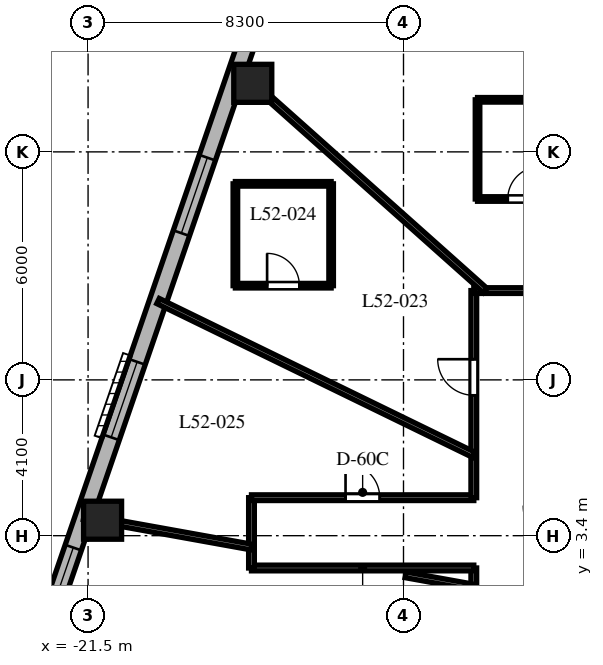
"""IFC4 building model, lengths in metres.
Left out: names, types, materials, properties, quantities, classifications, styles, units other than length and angle.
Written with IfcOpenShell. Run it as: python <this file> out.ifc"""

import sys

from ifc_helpers import new_model, si_unit, direction, frame, frame_2d, origin, origin_2d, place, context, subcontext, project, spatial, rectangle, extrude, element, fill, save


model = new_model("IFC4")
c1 = context("Model", 3, precision=1e-05, world=origin(), true_north=direction((0.0, 1.0)))
c2 = subcontext(c1, "Body", "Model", "MODEL_VIEW")
j1 = project(units=[si_unit("LENGTHUNIT", "METRE"), si_unit("PLANEANGLEUNIT", "RADIAN")], contexts=[c1])
p1 = place(None, origin())
s1 = spatial("IfcSite", under=j1, at=p1, CompositionType="ELEMENT")
p2 = place(p1, origin())
s2 = spatial("IfcBuilding", under=s1, at=p2, CompositionType="ELEMENT")
p3 = place(p2, frame((0.0, 0.0, 210.3)))
s3 = spatial("IfcBuildingStorey", under=s2, at=p3, CompositionType="ELEMENT", Elevation=210.3)
for number, where, z_axis, x_axis in (
    (1, (-17.166, 15.304, 0.0), (0.0, 0.0, 1.0), (1.0, 0.0, 0.0)),
    (2, (-21.118, 3.807, 0.0), (0.0, 0.0, 1.0), (1.0, 0.0, 0.0)),
):
    element("IfcColumn", number, at=place(p3, frame(where, z_axis=z_axis, x_axis=x_axis)), inside=s3, PredefinedType="COLUMN", context=c2, shape_type="SweptSolid", body=[
        extrude(rectangle(XDim=1.0, YDim=1.0, at=origin_2d()), origin(), (0.0, 0.0, 1.0), 3.8),
    ])
p4 = place(p3, frame((-16.324, 19.275, 0.0), z_axis=(0.0, 0.0, 1.0), x_axis=(-0.325083142304, -0.945685439557, 0.0)))
e3 = element("IfcWall", 3, at=p4, inside=s3, PredefinedType="SOLIDWALL", context=c2, shape_type="SweptSolid", body=[
    extrude(rectangle(XDim=20.224, YDim=0.45, at=frame_2d((10.112, 0.0))), origin(), (0.0, 0.0, 1.0), 3.5),
])
p5 = place(p4, frame((0.953, 0.0, 0.8)))
e4 = element("IfcOpeningElement", 4, at=p5, cuts=e3, PredefinedType="OPENING", context=c2, shape_type="SweptSolid", body=[
    extrude(rectangle(XDim=2.1, YDim=1.85, at=frame_2d((1.05, 0.925))), frame((0.0, 0.235, 0.0), z_axis=(0.0, -1.0, 0.0), x_axis=(1.0, 0.0, 0.0)), (0.0, 0.0, 1.0), 0.47),
])
p6 = place(p4, frame((6.268, 0.0, 0.8)))
e5 = element("IfcOpeningElement", 5, at=p6, cuts=e3, PredefinedType="OPENING", context=c2, shape_type="SweptSolid", body=[
    extrude(rectangle(XDim=2.1, YDim=1.85, at=frame_2d((1.05, 0.925))), frame((0.0, 0.235, 0.0), z_axis=(0.0, -1.0, 0.0), x_axis=(1.0, 0.0, 0.0)), (0.0, 0.0, 1.0), 0.47),
])
p7 = place(p4, frame((11.95, 0.0, 0.8)))
e6 = element("IfcOpeningElement", 6, at=p7, cuts=e3, PredefinedType="OPENING", context=c2, shape_type="SweptSolid", body=[
    extrude(rectangle(XDim=2.1, YDim=1.85, at=frame_2d((1.05, 0.925))), frame((0.0, 0.235, 0.0), z_axis=(0.0, -1.0, 0.0), x_axis=(1.0, 0.0, 0.0)), (0.0, 0.0, 1.0), 0.47),
])
p8 = place(p4, frame((17.118, 0.0, 0.8)))
e7 = element("IfcOpeningElement", 7, at=p8, cuts=e3, PredefinedType="OPENING", context=c2, shape_type="SweptSolid", body=[
    extrude(rectangle(XDim=2.1, YDim=1.85, at=frame_2d((1.05, 0.925))), frame((0.0, 0.235, 0.0), z_axis=(0.0, -1.0, 0.0), x_axis=(1.0, 0.0, 0.0)), (0.0, 0.0, 1.0), 0.47),
])
p9 = place(p3, frame((-11.35, -9.85, 0.0), z_axis=(0.0, 0.0, 1.0), x_axis=(0.0, 1.0, 0.0)))
e8 = element("IfcWall", 8, at=p9, inside=s3, PredefinedType="PARTITIONING", context=c2, shape_type="SweptSolid", body=[
    extrude(rectangle(XDim=12.4, YDim=0.15, at=frame_2d((6.2, 0.0))), origin(), (0.0, 0.0, 1.0), 2.99),
])
p10 = place(p9, frame((10.017, 0.0, 0.0)))
e9 = element("IfcOpeningElement", 9, at=p10, cuts=e8, PredefinedType="OPENING", context=c2, shape_type="SweptSolid", body=[
    extrude(rectangle(XDim=0.9, YDim=2.03, at=frame_2d((0.45, 1.015))), frame((0.0, 0.085, 0.0), z_axis=(0.0, -1.0, 0.0), x_axis=(1.0, 0.0, 0.0)), (0.0, 0.0, 1.0), 0.17),
])
p11 = place(p9, frame((7.427, 0.0, 0.0)))
e10 = element("IfcOpeningElement", 10, at=p11, cuts=e8, PredefinedType="OPENING", context=c2, shape_type="SweptSolid", body=[
    extrude(rectangle(XDim=0.9, YDim=2.03, at=frame_2d((0.45, 1.015))), frame((0.0, 0.085, 0.0), z_axis=(0.0, -1.0, 0.0), x_axis=(1.0, 0.0, 0.0)), (0.0, 0.0, 1.0), 0.17),
])
p12 = place(p9, frame((3.01, 0.0, 0.0)))
e11 = element("IfcOpeningElement", 11, at=p12, cuts=e8, PredefinedType="OPENING", context=c2, shape_type="SweptSolid", body=[
    extrude(rectangle(XDim=0.95, YDim=2.03, at=frame_2d((0.475, 1.015))), frame((0.0, 0.085, 0.0), z_axis=(0.0, -1.0, 0.0), x_axis=(1.0, 0.0, 0.0)), (0.0, 0.0, 1.0), 0.17),
])
p13 = place(p3, frame((-11.35, 2.55, 0.0), z_axis=(0.0, 0.0, 1.0), x_axis=(-1.0, 0.0, 0.0)))
e12 = element("IfcWall", 12, at=p13, inside=s3, PredefinedType="PARTITIONING", context=c2, shape_type="SweptSolid", body=[
    extrude(rectangle(XDim=5.85, YDim=0.15, at=frame_2d((2.925, 0.0))), origin(), (0.0, 0.0, 1.0), 2.94),
])
p14 = place(p3, frame((-17.2, 2.55, 0.0), z_axis=(0.0, 0.0, 1.0), x_axis=(0.0, 1.0, 0.0)))
e13 = element("IfcWall", 13, at=p14, inside=s3, PredefinedType="PARTITIONING", context=c2, shape_type="SweptSolid", body=[
    extrude(rectangle(XDim=1.85, YDim=0.15, at=frame_2d((0.925, 0.0))), origin(), (0.0, 0.0, 1.0), 2.94),
])
p15 = place(p3, frame((-17.2, 4.4, 0.0), z_axis=(0.0, 0.0, 1.0), x_axis=(1.0, 0.0, 0.0)))
e14 = element("IfcWall", 14, at=p15, inside=s3, PredefinedType="PARTITIONING", context=c2, shape_type="SweptSolid", body=[
    extrude(rectangle(XDim=5.85, YDim=0.15, at=frame_2d((2.925, 0.0))), origin(), (0.0, 0.0, 1.0), 2.94),
])
p16 = place(p15, frame((2.475, 0.0, 0.0)))
e15 = element("IfcOpeningElement", 15, at=p16, cuts=e14, PredefinedType="OPENING", context=c2, shape_type="SweptSolid", body=[
    extrude(rectangle(XDim=0.9, YDim=2.03, at=frame_2d((0.45, 1.015))), frame((0.0, 0.085, 0.0), z_axis=(0.0, -1.0, 0.0), x_axis=(1.0, 0.0, 0.0)), (0.0, 0.0, 1.0), 0.17),
])
p17 = place(p3, frame((-11.35, 4.4, 0.0), z_axis=(0.0, 0.0, 1.0), x_axis=(0.0, 1.0, 0.0)))
e16 = element("IfcWall", 16, at=p17, inside=s3, PredefinedType="PARTITIONING", context=c2, shape_type="SweptSolid", body=[
    extrude(rectangle(XDim=5.45, YDim=0.15, at=frame_2d((2.725, 0.0))), origin(), (0.0, 0.0, 1.0), 2.99),
])
p18 = place(p17, frame((2.694, 0.0, 0.0)))
e17 = element("IfcOpeningElement", 17, at=p18, cuts=e16, PredefinedType="OPENING", context=c2, shape_type="SweptSolid", body=[
    extrude(rectangle(XDim=0.95, YDim=2.03, at=frame_2d((0.475, 1.015))), frame((0.0, 0.085, 0.0), z_axis=(0.0, -1.0, 0.0), x_axis=(1.0, 0.0, 0.0)), (0.0, 0.0, 1.0), 0.17),
])
p19 = place(p3, frame((-11.35, 9.85, 0.0), z_axis=(0.0, 0.0, 1.0), x_axis=(1.0, 0.0, 0.0)))
e18 = element("IfcWall", 18, at=p19, inside=s3, PredefinedType="PARTITIONING", context=c2, shape_type="SweptSolid", body=[
    extrude(rectangle(XDim=10.43, YDim=0.15, at=frame_2d((5.215, 0.0))), origin(), (0.0, 0.0, 1.0), 2.99),
])
p20 = place(p19, frame((8.362, 0.0, 0.0)))
e19 = element("IfcOpeningElement", 19, at=p20, cuts=e18, PredefinedType="OPENING", context=c2, shape_type="SweptSolid", body=[
    extrude(rectangle(XDim=0.95, YDim=2.03, at=frame_2d((0.475, 1.015))), frame((0.0, 0.085, 0.0), z_axis=(0.0, -1.0, 0.0), x_axis=(1.0, 0.0, 0.0)), (0.0, 0.0, 1.0), 0.17),
])
p21 = place(p19, frame((3.396, 0.0, 0.0)))
e20 = element("IfcOpeningElement", 20, at=p21, cuts=e18, PredefinedType="OPENING", context=c2, shape_type="SweptSolid", body=[
    extrude(rectangle(XDim=0.95, YDim=2.03, at=frame_2d((0.475, 1.015))), frame((0.0, 0.085, 0.0), z_axis=(0.0, -1.0, 0.0), x_axis=(1.0, 0.0, 0.0)), (0.0, 0.0, 1.0), 0.17),
])
p22 = place(p3, frame((-11.048, 9.85, 0.0), z_axis=(0.0, 0.0, 1.0), x_axis=(-0.746444434655, 0.665447748492, 0.0)))
e21 = element("IfcWall", 21, at=p22, inside=s3, PredefinedType="PARTITIONING", context=c2, shape_type="SweptSolid", body=[
    extrude(rectangle(XDim=8.732, YDim=0.15, at=frame_2d((4.366, 0.0))), origin(), (0.0, 0.0, 1.0), 2.74),
])
p23 = place(p3, frame((-11.35, 5.528, 0.0), z_axis=(0.0, 0.0, 1.0), x_axis=(-0.899038669565, 0.437869239188, 0.0)))
e22 = element("IfcWall", 22, at=p23, inside=s3, PredefinedType="PARTITIONING", context=c2, shape_type="SweptSolid", body=[
    extrude(rectangle(XDim=9.242, YDim=0.15, at=frame_2d((4.621, 0.0))), origin(), (0.0, 0.0, 1.0), 2.74),
])
p24 = place(p3, frame((-11.35, 2.046, 0.0), z_axis=(0.0, 0.0, 1.0), x_axis=(-0.984127783205, 0.177461281195, 0.0)))
e23 = element("IfcWall", 23, at=p24, inside=s3, PredefinedType="PARTITIONING", context=c2, shape_type="SweptSolid", body=[
    extrude(rectangle(XDim=1.826, YDim=0.15, at=frame_2d((0.913, 0.0))), origin(), (0.0, 0.0, 1.0), 3.5),
])
p25 = place(p3, frame((-17.2, 3.101, 0.0), z_axis=(0.0, 0.0, 1.0), x_axis=(-0.98413465883, 0.177423147559, 0.0)))
e24 = element("IfcWall", 24, at=p25, inside=s3, PredefinedType="PARTITIONING", context=c2, shape_type="SweptSolid", body=[
    extrude(rectangle(XDim=4.482, YDim=0.15, at=frame_2d((2.241, 0.0))), origin(), (0.0, 0.0, 1.0), 2.74),
])
p26 = place(p3, frame((-11.252, 12.26, 0.0), z_axis=(0.0, 0.0, 1.0), x_axis=(1.0, 0.0, 0.0)))
e25 = element("IfcWall", 25, at=p26, inside=s3, PredefinedType="PARTITIONING", context=c2, shape_type="SweptSolid", body=[
    extrude(rectangle(XDim=2.44, YDim=0.12, at=frame_2d((1.22, 0.0))), origin(), (0.0, 0.0, 1.0), 3.072),
])
p27 = place(p26, frame((0.795, 0.0, 0.0)))
e26 = element("IfcOpeningElement", 26, at=p27, cuts=e25, PredefinedType="OPENING", context=c2, shape_type="SweptSolid", body=[
    extrude(rectangle(XDim=0.85, YDim=2.03, at=frame_2d((0.425, 1.015))), frame((0.0, 0.07, 0.0), z_axis=(0.0, -1.0, 0.0), x_axis=(1.0, 0.0, 0.0)), (0.0, 0.0, 1.0), 0.14),
])
p28 = place(p3, frame((-8.812, 14.87, 0.0), z_axis=(0.0, 0.0, 1.0), x_axis=(-1.0, 0.0, 0.0)))
e27 = element("IfcWall", 27, at=p28, inside=s3, PredefinedType="PARTITIONING", context=c2, shape_type="SweptSolid", body=[
    extrude(rectangle(XDim=2.44, YDim=0.12, at=frame_2d((1.22, 0.0))), origin(), (0.0, 0.0, 1.0), 3.026),
])
p29 = place(p3, frame((-11.252, 14.87, 0.0), z_axis=(0.0, 0.0, 1.0), x_axis=(0.0, -1.0, 0.0)))
e28 = element("IfcWall", 28, at=p29, inside=s3, PredefinedType="PARTITIONING", context=c2, shape_type="SweptSolid", body=[
    extrude(rectangle(XDim=2.61, YDim=0.12, at=frame_2d((1.305, 0.0))), origin(), (0.0, 0.0, 1.0), 3.026),
])
p30 = place(p3, frame((-17.624, 9.979, 0.0), z_axis=(0.0, 0.0, 1.0), x_axis=(1.0, 0.0, 0.0)))
e29 = element("IfcWall", 29, at=p30, inside=s3, PredefinedType="PARTITIONING", context=c2, shape_type="SweptSolid", body=[
    extrude(rectangle(XDim=2.52, YDim=0.12, at=frame_2d((1.26, 0.0))), origin(), (0.0, 0.0, 1.0), 3.072),
])
p31 = place(p30, frame((0.835, 0.0, 0.0)))
e30 = element("IfcOpeningElement", 30, at=p31, cuts=e29, PredefinedType="OPENING", context=c2, shape_type="SweptSolid", body=[
    extrude(rectangle(XDim=0.85, YDim=2.03, at=frame_2d((0.425, 1.015))), frame((0.0, 0.07, 0.0), z_axis=(0.0, -1.0, 0.0), x_axis=(1.0, 0.0, 0.0)), (0.0, 0.0, 1.0), 0.14),
])
p32 = place(p3, frame((-15.104, 9.979, 0.0), z_axis=(0.0, 0.0, 1.0), x_axis=(0.0, 1.0, 0.0)))
e31 = element("IfcWall", 31, at=p32, inside=s3, PredefinedType="PARTITIONING", context=c2, shape_type="SweptSolid", body=[
    extrude(rectangle(XDim=2.68, YDim=0.12, at=frame_2d((1.34, 0.0))), origin(), (0.0, 0.0, 1.0), 3.072),
])
p33 = place(p3, frame((-15.104, 12.659, 0.0), z_axis=(0.0, 0.0, 1.0), x_axis=(-1.0, 0.0, 0.0)))
e32 = element("IfcWall", 32, at=p33, inside=s3, PredefinedType="PARTITIONING", context=c2, shape_type="SweptSolid", body=[
    extrude(rectangle(XDim=2.52, YDim=0.12, at=frame_2d((1.26, 0.0))), origin(), (0.0, 0.0, 1.0), 3.5),
])
p34 = place(p3, frame((-17.624, 12.659, 0.0), z_axis=(0.0, 0.0, 1.0), x_axis=(0.0, -1.0, 0.0)))
e33 = element("IfcWall", 33, at=p34, inside=s3, PredefinedType="PARTITIONING", context=c2, shape_type="SweptSolid", body=[
    extrude(rectangle(XDim=2.68, YDim=0.12, at=frame_2d((1.34, 0.0))), origin(), (0.0, 0.0, 1.0), 3.5),
])
p35 = place(p6, origin())
e34 = element("IfcWindow", 34, at=p35, inside=s3, PartitioningType="SINGLE_PANEL", PredefinedType="WINDOW", context=c2, shape_type="SweptSolid", body=[
    extrude(rectangle(XDim=2.1, YDim=1.85, at=frame_2d((1.05, 0.925))), frame((0.0, 0.03, 0.0), z_axis=(0.0, -1.0, 0.0), x_axis=(1.0, 0.0, 0.0)), (0.0, 0.0, 1.0), 0.06),
])
fill(e5, e34)
p36 = place(p7, origin())
e35 = element("IfcWindow", 35, at=p36, inside=s3, PartitioningType="SINGLE_PANEL", PredefinedType="WINDOW", context=c2, shape_type="SweptSolid", body=[
    extrude(rectangle(XDim=2.1, YDim=1.85, at=frame_2d((1.05, 0.925))), frame((0.0, 0.03, 0.0), z_axis=(0.0, -1.0, 0.0), x_axis=(1.0, 0.0, 0.0)), (0.0, 0.0, 1.0), 0.06),
])
fill(e6, e35)
p37 = place(p8, origin())
e36 = element("IfcWindow", 36, at=p37, inside=s3, PartitioningType="SINGLE_PANEL", PredefinedType="WINDOW", context=c2, shape_type="SweptSolid", body=[
    extrude(rectangle(XDim=2.1, YDim=1.85, at=frame_2d((1.05, 0.925))), frame((0.0, 0.03, 0.0), z_axis=(0.0, -1.0, 0.0), x_axis=(1.0, 0.0, 0.0)), (0.0, 0.0, 1.0), 0.06),
])
fill(e7, e36)
p38 = place(p27, origin())
e37 = element("IfcDoor", 37, at=p38, inside=s3, OperationType="SINGLE_SWING_RIGHT", PredefinedType="DOOR", context=c2, shape_type="SweptSolid", body=[
    extrude(rectangle(XDim=0.85, YDim=2.03, at=frame_2d((0.425, 1.015))), frame((0.0, 0.025, 0.0), z_axis=(0.0, -1.0, 0.0), x_axis=(1.0, 0.0, 0.0)), (0.0, 0.0, 1.0), 0.05),
])
fill(e26, e37)
p39 = place(p18, origin())
e38 = element("IfcDoor", 38, at=p39, inside=s3, OperationType="SINGLE_SWING_RIGHT", PredefinedType="DOOR", context=c2, shape_type="SweptSolid", body=[
    extrude(rectangle(XDim=0.95, YDim=2.03, at=frame_2d((0.475, 1.015))), frame((0.0, 0.025, 0.0), z_axis=(0.0, -1.0, 0.0), x_axis=(1.0, 0.0, 0.0)), (0.0, 0.0, 1.0), 0.05),
])
fill(e17, e38)
p40 = place(p31, origin())
e39 = element("IfcDoor", 39, at=p40, inside=s3, OperationType="SINGLE_SWING_LEFT", PredefinedType="DOOR", context=c2, shape_type="SweptSolid", body=[
    extrude(rectangle(XDim=0.85, YDim=2.03, at=frame_2d((0.425, 1.015))), frame((0.0, 0.025, 0.0), z_axis=(0.0, -1.0, 0.0), x_axis=(1.0, 0.0, 0.0)), (0.0, 0.0, 1.0), 0.05),
])
fill(e30, e39)
p41 = place(p16, origin())
e40 = element("IfcDoor", 40, at=p41, inside=s3, OperationType="SINGLE_SWING_LEFT", PredefinedType="DOOR", context=c2, shape_type="SweptSolid", body=[
    extrude(rectangle(XDim=0.9, YDim=2.03, at=frame_2d((0.45, 1.015))), frame((0.0, 0.025, 0.0), z_axis=(0.0, -1.0, 0.0), x_axis=(1.0, 0.0, 0.0)), (0.0, 0.0, 1.0), 0.05),
])
fill(e15, e40)
save(model, sys.argv[1])
